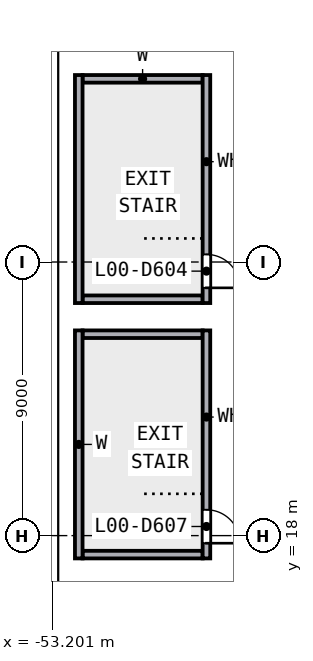
"""IFC4 building model, lengths in metres.
Left out: names, types, materials, properties, quantities, classifications, styles, units other than length and angle.
Written with IfcOpenShell. Run it as: python <this file> out.ifc"""

import sys

from ifc_helpers import new_model, si_unit, direction, frame, frame_2d, origin, place, context, subcontext, project, spatial, rectangle, extrude, element, fill, save


model = new_model("IFC4")
c1 = context("Model", 3, precision=1e-05, world=origin(), true_north=direction((0.0, 1.0)))
c2 = subcontext(c1, "Body", "Model", "MODEL_VIEW")
j1 = project(units=[si_unit("LENGTHUNIT", "METRE"), si_unit("PLANEANGLEUNIT", "RADIAN")], contexts=[c1])
p1 = place(None, origin())
s1 = spatial("IfcSite", under=j1, at=p1, CompositionType="ELEMENT")
p2 = place(p1, origin())
s2 = spatial("IfcBuilding", under=s1, at=p2, CompositionType="ELEMENT")
p3 = place(p2, origin())
s3 = spatial("IfcBuildingStorey", under=s2, at=p3, CompositionType="ELEMENT", Elevation=0.0)
p4 = place(p3, frame((-52.325, 25.65, 0.0), z_axis=(0.0, 0.0, 1.0), x_axis=(0.0, 1.0, 0.0)))
e1 = element("IfcWall", 1, at=p4, inside=s3, PredefinedType="SOLIDWALL", context=c2, shape_type="SweptSolid", body=[
    extrude(rectangle(XDim=7.5, YDim=0.25, at=frame_2d((3.75, 0.0))), origin(), (0.0, 0.0, 1.0), 3.4),
])
p5 = place(p3, frame((-48.125, 33.15, 0.0), z_axis=(0.0, 0.0, 1.0), x_axis=(0.0, -1.0, 0.0)))
e2 = element("IfcWall", 2, at=p5, inside=s3, PredefinedType="SOLIDWALL", context=c2, shape_type="SweptSolid", body=[
    extrude(rectangle(XDim=7.5, YDim=0.25, at=frame_2d((3.75, 0.0))), origin(), (0.0, 0.0, 1.0), 3.4),
])
p6 = place(p5, frame((5.9, 0.0, 0.0)))
e3 = element("IfcOpeningElement", 3, at=p6, cuts=e2, PredefinedType="OPENING", context=c2, shape_type="SweptSolid", body=[
    extrude(rectangle(XDim=1.1, YDim=2.1, at=frame_2d((0.55, 1.05))), frame((0.0, 0.135, 0.0), z_axis=(0.0, -1.0, 0.0), x_axis=(1.0, 0.0, 0.0)), (0.0, 0.0, 1.0), 0.27),
])
for number, where, z_axis, x_axis in (
    (4, (-48.25, 25.775, 0.0), (0.0, 0.0, 1.0), (-1.0, 0.0, 0.0)),
    (5, (-48.25, 33.025, 0.0), (0.0, 0.0, 1.0), (-1.0, 0.0, 0.0)),
):
    element("IfcWall", number, at=place(p3, frame(where, z_axis=z_axis, x_axis=x_axis)), inside=s3, PredefinedType="SOLIDWALL", context=c2, shape_type="SweptSolid", body=[
        extrude(rectangle(XDim=3.95, YDim=0.25, at=frame_2d((1.975, 0.0))), origin(), (0.0, 0.0, 1.0), 3.4),
    ])
p7 = place(p3, frame((-52.325, 17.25, 0.0), z_axis=(0.0, 0.0, 1.0), x_axis=(0.0, 1.0, 0.0)))
e6 = element("IfcWall", 6, at=p7, inside=s3, PredefinedType="SOLIDWALL", context=c2, shape_type="SweptSolid", body=[
    extrude(rectangle(XDim=7.5, YDim=0.25, at=frame_2d((3.75, 0.0))), origin(), (0.0, 0.0, 1.0), 3.4),
])
p8 = place(p3, frame((-48.125, 24.75, 0.0), z_axis=(0.0, 0.0, 1.0), x_axis=(0.0, -1.0, 0.0)))
e7 = element("IfcWall", 7, at=p8, inside=s3, PredefinedType="SOLIDWALL", context=c2, shape_type="SweptSolid", body=[
    extrude(rectangle(XDim=7.5, YDim=0.25, at=frame_2d((3.75, 0.0))), origin(), (0.0, 0.0, 1.0), 3.4),
])
p9 = place(p8, frame((5.9, 0.0, 0.0)))
e8 = element("IfcOpeningElement", 8, at=p9, cuts=e7, PredefinedType="OPENING", context=c2, shape_type="SweptSolid", body=[
    extrude(rectangle(XDim=1.1, YDim=2.1, at=frame_2d((0.55, 1.05))), frame((0.0, 0.135, 0.0), z_axis=(0.0, -1.0, 0.0), x_axis=(1.0, 0.0, 0.0)), (0.0, 0.0, 1.0), 0.27),
])
for number, where, z_axis, x_axis in (
    (9, (-48.25, 17.375, 0.0), (0.0, 0.0, 1.0), (-1.0, 0.0, 0.0)),
    (10, (-48.25, 24.625, 0.0), (0.0, 0.0, 1.0), (-1.0, 0.0, 0.0)),
):
    element("IfcWall", number, at=place(p3, frame(where, z_axis=z_axis, x_axis=x_axis)), inside=s3, PredefinedType="SOLIDWALL", context=c2, shape_type="SweptSolid", body=[
        extrude(rectangle(XDim=3.95, YDim=0.25, at=frame_2d((1.975, 0.0))), origin(), (0.0, 0.0, 1.0), 3.4),
    ])
p10 = place(p6, origin())
e11 = element("IfcDoor", 11, at=p10, inside=s3, OperationType="SINGLE_SWING_RIGHT", PredefinedType="DOOR", context=c2, shape_type="SweptSolid", body=[
    extrude(rectangle(XDim=1.1, YDim=2.1, at=frame_2d((0.55, 1.05))), frame((0.0, 0.025, 0.0), z_axis=(0.0, -1.0, 0.0), x_axis=(1.0, 0.0, 0.0)), (0.0, 0.0, 1.0), 0.05),
])
fill(e3, e11)
p11 = place(p9, origin())
e12 = element("IfcDoor", 12, at=p11, inside=s3, OperationType="SINGLE_SWING_RIGHT", PredefinedType="DOOR", context=c2, shape_type="SweptSolid", body=[
    extrude(rectangle(XDim=1.1, YDim=2.1, at=frame_2d((0.55, 1.05))), frame((0.0, 0.025, 0.0), z_axis=(0.0, -1.0, 0.0), x_axis=(1.0, 0.0, 0.0)), (0.0, 0.0, 1.0), 0.05),
])
fill(e8, e12)
save(model, sys.argv[1])
